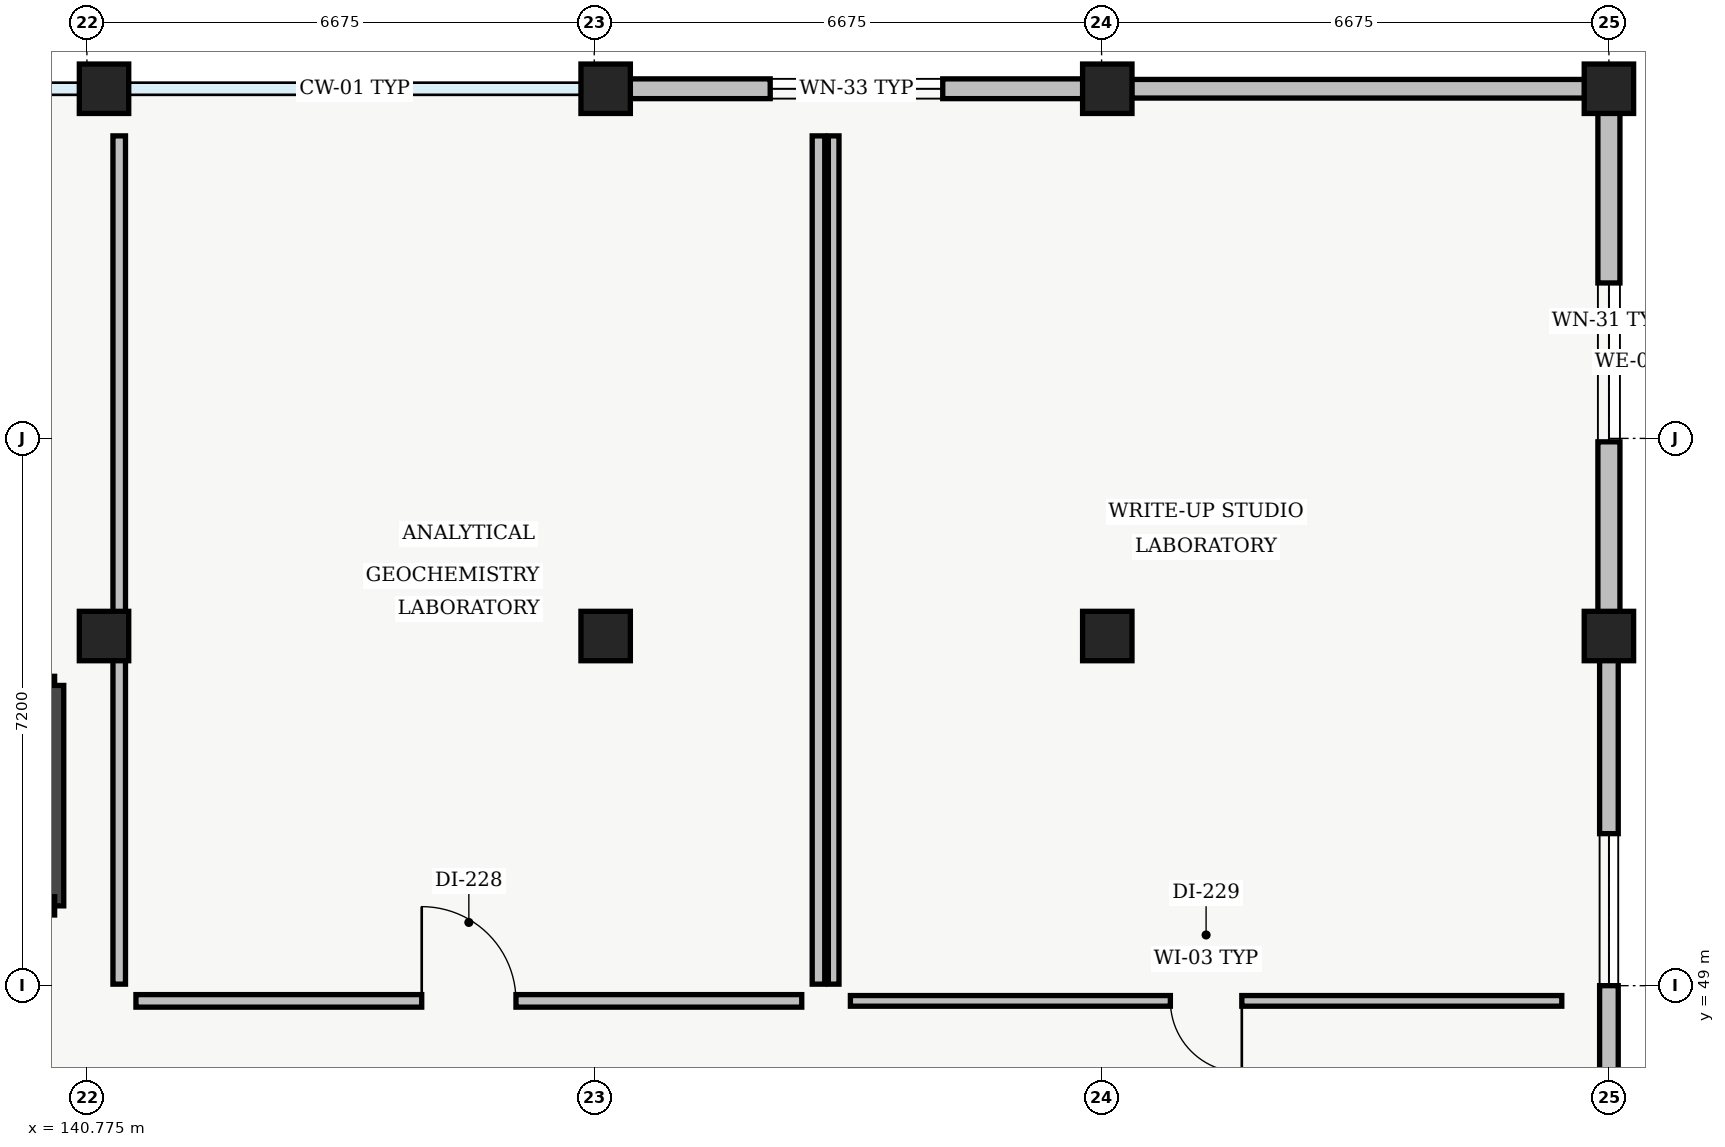
"""IFC4 building model, lengths in metres.
Left out: names, types, materials, properties, quantities, classifications, styles, units other than length and angle.
Written with IfcOpenShell. Run it as: python <this file> out.ifc"""

import sys

from ifc_helpers import new_model, si_unit, direction, frame, frame_2d, origin, origin_2d, place, context, subcontext, project, spatial, rectangle, extrude, element, fill, save


model = new_model("IFC4")
c1 = context("Model", 3, precision=1e-05, world=origin(), true_north=direction((0.0, 1.0)))
c2 = subcontext(c1, "Body", "Model", "MODEL_VIEW")
j1 = project(units=[si_unit("LENGTHUNIT", "METRE"), si_unit("PLANEANGLEUNIT", "RADIAN")], contexts=[c1])
p1 = place(None, origin())
s1 = spatial("IfcSite", under=j1, at=p1, CompositionType="ELEMENT")
p2 = place(p1, origin())
s2 = spatial("IfcBuilding", under=s1, at=p2, CompositionType="ELEMENT")
p3 = place(p2, frame((0.0, 0.0, 18.6)))
s3 = spatial("IfcBuildingStorey", under=s2, at=p3, CompositionType="ELEMENT", Elevation=18.6)
for number, where, z_axis, x_axis in (
    (1, (141.0, 53.6, 0.0), (0.0, 0.0, 1.0), (1.0, 0.0, 0.0)),
    (2, (141.0, 60.8, 0.0), (0.0, 0.0, 1.0), (1.0, 0.0, 0.0)),
    (3, (147.6, 53.6, 0.0), (0.0, 0.0, 1.0), (1.0, 0.0, 0.0)),
    (4, (147.6, 60.8, 0.0), (0.0, 0.0, 1.0), (1.0, 0.0, 0.0)),
    (5, (154.2, 53.6, 0.0), (0.0, 0.0, 1.0), (1.0, 0.0, 0.0)),
    (6, (154.2, 60.8, 0.0), (0.0, 0.0, 1.0), (1.0, 0.0, 0.0)),
    (7, (160.8, 53.6, 0.0), (0.0, 0.0, 1.0), (1.0, 0.0, 0.0)),
    (8, (160.8, 60.8, 0.0), (0.0, 0.0, 1.0), (1.0, 0.0, 0.0)),
):
    element("IfcColumn", number, at=place(p3, frame(where, z_axis=z_axis, x_axis=x_axis)), inside=s3, PredefinedType="COLUMN", context=c2, shape_type="SweptSolid", body=[
        extrude(rectangle(XDim=0.65, YDim=0.65, at=origin_2d()), origin(), (0.0, 0.0, 1.0), 4.3),
    ])
p4 = place(p3, frame((147.92, 60.8, 0.0), z_axis=(0.0, 0.0, 1.0), x_axis=(1.0, 0.0, 0.0)))
e9 = element("IfcWall", 9, at=p4, inside=s3, PredefinedType="STANDARD", context=c2, shape_type="SweptSolid", body=[
    extrude(rectangle(XDim=5.96, YDim=0.26, at=frame_2d((2.98, 0.0))), origin(), (0.0, 0.0, 1.0), 3.835),
])
p5 = place(p4, frame((1.845, 0.0, 0.95)))
e10 = element("IfcOpeningElement", 10, at=p5, cuts=e9, PredefinedType="OPENING", context=c2, shape_type="SweptSolid", body=[
    extrude(rectangle(XDim=2.27, YDim=1.48, at=frame_2d((1.135, 0.74))), frame((0.0, 0.13, 0.0), z_axis=(0.0, -1.0, 0.0), x_axis=(1.0, 0.0, 0.0)), (0.0, 0.0, 1.0), 0.26),
])
p6 = place(p3, frame((154.52, 60.8, 0.0), z_axis=(0.0, 0.0, 1.0), x_axis=(1.0, 0.0, 0.0)))
e11 = element("IfcWall", 11, at=p6, inside=s3, PredefinedType="STANDARD", context=c2, shape_type="SweptSolid", body=[
    extrude(rectangle(XDim=5.96, YDim=0.245, at=frame_2d((2.98, 0.0))), origin(), (0.0, 0.0, 1.0), 3.835),
])
p7 = place(p3, frame((160.8, 60.48, 0.0), z_axis=(0.0, 0.0, 1.0), x_axis=(0.0, -1.0, 0.0)))
e12 = element("IfcWall", 12, at=p7, inside=s3, PredefinedType="STANDARD", context=c2, shape_type="SweptSolid", body=[
    extrude(rectangle(XDim=6.56, YDim=0.29, at=frame_2d((3.28, 0.0))), origin(), (0.0, 0.0, 1.0), 3.835),
])
p8 = place(p7, frame((2.235, 0.0, 0.95)))
e13 = element("IfcOpeningElement", 13, at=p8, cuts=e12, PredefinedType="OPENING", context=c2, shape_type="SweptSolid", body=[
    extrude(rectangle(XDim=2.09, YDim=1.44, at=frame_2d((1.045, 0.72))), frame((0.0, 0.145, 0.0), z_axis=(0.0, -1.0, 0.0), x_axis=(1.0, 0.0, 0.0)), (0.0, 0.0, 1.0), 0.29),
])
p9 = place(p3, frame((160.8, 53.28, 0.0), z_axis=(0.0, 0.0, 1.0), x_axis=(0.0, -1.0, 0.0)))
e14 = element("IfcWall", 14, at=p9, inside=s3, PredefinedType="STANDARD", context=c2, shape_type="SweptSolid", body=[
    extrude(rectangle(XDim=6.56, YDim=0.245, at=frame_2d((3.28, 0.0))), origin(), (0.0, 0.0, 1.0), 3.835),
])
p10 = place(p9, frame((2.28, 0.0, 0.95)))
e15 = element("IfcOpeningElement", 15, at=p10, cuts=e14, PredefinedType="OPENING", context=c2, shape_type="SweptSolid", body=[
    extrude(rectangle(XDim=2.0, YDim=1.42, at=frame_2d((1.0, 0.71))), frame((0.0, 0.123, 0.0), z_axis=(0.0, -1.0, 0.0), x_axis=(1.0, 0.0, 0.0)), (0.0, 0.0, 1.0), 0.245),
])
p11 = place(p3, frame((138.05, 52.95, 0.0), z_axis=(0.0, 0.0, 1.0), x_axis=(1.0, 0.0, 0.0)))
e16 = element("IfcWall", 16, at=p11, inside=s3, PredefinedType="SHEAR", context=c2, shape_type="SweptSolid", body=[
    extrude(rectangle(XDim=2.3, YDim=0.24, at=frame_2d((1.15, 0.0))), origin(), (0.0, 0.0, 1.0), 4.28),
])
p12 = place(p3, frame((140.35, 52.95, 0.0), z_axis=(0.0, 0.0, 1.0), x_axis=(0.0, -1.0, 0.0)))
e17 = element("IfcWall", 17, at=p12, inside=s3, PredefinedType="SHEAR", context=c2, shape_type="SweptSolid", body=[
    extrude(rectangle(XDim=2.9, YDim=0.24, at=frame_2d((1.45, 0.0))), origin(), (0.0, 0.0, 1.0), 4.28),
])
p13 = place(p3, frame((140.35, 50.05, 0.0), z_axis=(0.0, 0.0, 1.0), x_axis=(-1.0, 0.0, 0.0)))
e18 = element("IfcWall", 18, at=p13, inside=s3, PredefinedType="SHEAR", context=c2, shape_type="SweptSolid", body=[
    extrude(rectangle(XDim=2.3, YDim=0.24, at=frame_2d((1.15, 0.0))), origin(), (0.0, 0.0, 1.0), 4.28),
])
p14 = place(p13, frame((0.425, 0.0, 0.0)))
e19 = element("IfcOpeningElement", 19, at=p14, cuts=e18, PredefinedType="OPENING", context=c2, shape_type="SweptSolid", body=[
    extrude(rectangle(XDim=1.45, YDim=2.3, at=frame_2d((0.725, 1.15))), frame((0.0, 0.12, 0.0), z_axis=(0.0, -1.0, 0.0), x_axis=(1.0, 0.0, 0.0)), (0.0, 0.0, 1.0), 0.24),
])
p15 = place(p3, frame((141.42, 48.8, 0.0), z_axis=(0.0, 0.0, 1.0), x_axis=(1.0, 0.0, 0.0)))
e20 = element("IfcWall", 20, at=p15, inside=s3, PredefinedType="PARTITIONING", context=c2, shape_type="SweptSolid", body=[
    extrude(rectangle(XDim=8.76, YDim=0.165, at=frame_2d((4.38, 0.0))), origin(), (0.0, 0.0, 1.0), 3.885),
])
p16 = place(p15, frame((3.76, 0.0, 0.0)))
e21 = element("IfcOpeningElement", 21, at=p16, cuts=e20, PredefinedType="OPENING", context=c2, shape_type="SweptSolid", body=[
    extrude(rectangle(XDim=1.24, YDim=2.06, at=frame_2d((0.62, 1.03))), frame((0.0, 0.083, 0.0), z_axis=(0.0, -1.0, 0.0), x_axis=(1.0, 0.0, 0.0)), (0.0, 0.0, 1.0), 0.165),
])
p17 = place(p3, frame((150.4, 49.02, 0.0), z_axis=(0.0, 0.0, 1.0), x_axis=(0.0, 1.0, 0.0)))
e22 = element("IfcWall", 22, at=p17, inside=s3, PredefinedType="PARTITIONING", context=c2, shape_type="SweptSolid", body=[
    extrude(rectangle(XDim=11.16, YDim=0.165, at=frame_2d((5.58, 0.0))), origin(), (0.0, 0.0, 1.0), 3.95),
])
p18 = place(p3, frame((141.2, 60.18, 0.0), z_axis=(0.0, 0.0, 1.0), x_axis=(0.0, -1.0, 0.0)))
e23 = element("IfcWall", 23, at=p18, inside=s3, PredefinedType="PARTITIONING", context=c2, shape_type="SweptSolid", body=[
    extrude(rectangle(XDim=11.16, YDim=0.165, at=frame_2d((5.58, 0.0))), origin(), (0.0, 0.0, 1.0), 3.685),
])
p19 = place(p3, frame((150.82, 48.8, 0.0), z_axis=(0.0, 0.0, 1.0), x_axis=(1.0, 0.0, 0.0)))
e24 = element("IfcWall", 24, at=p19, inside=s3, PredefinedType="PARTITIONING", context=c2, shape_type="SweptSolid", body=[
    extrude(rectangle(XDim=9.36, YDim=0.14, at=frame_2d((4.68, 0.0))), origin(), (0.0, 0.0, 1.0), 3.885),
])
p20 = place(p19, frame((4.21, 0.0, 0.0)))
e25 = element("IfcOpeningElement", 25, at=p20, cuts=e24, PredefinedType="OPENING", context=c2, shape_type="SweptSolid", body=[
    extrude(rectangle(XDim=0.94, YDim=2.12, at=frame_2d((0.47, 1.06))), frame((0.0, 0.07, 0.0), z_axis=(0.0, -1.0, 0.0), x_axis=(1.0, 0.0, 0.0)), (0.0, 0.0, 1.0), 0.14),
])
p21 = place(p3, frame((150.6, 60.18, 0.0), z_axis=(0.0, 0.0, 1.0), x_axis=(0.0, -1.0, 0.0)))
e26 = element("IfcWall", 26, at=p21, inside=s3, PredefinedType="PARTITIONING", context=c2, shape_type="SweptSolid", body=[
    extrude(rectangle(XDim=11.16, YDim=0.14, at=frame_2d((5.58, 0.0))), origin(), (0.0, 0.0, 1.0), 3.95),
])
p22 = place(p5, origin())
e27 = element("IfcWindow", 27, at=p22, inside=s3, PartitioningType="SINGLE_PANEL", PredefinedType="WINDOW", context=c2, shape_type="SweptSolid", body=[
    extrude(rectangle(XDim=2.27, YDim=1.48, at=frame_2d((1.135, 0.74))), frame((0.0, 0.03, 0.0), z_axis=(0.0, -1.0, 0.0), x_axis=(1.0, 0.0, 0.0)), (0.0, 0.0, 1.0), 0.06),
])
fill(e10, e27)
p23 = place(p8, origin())
e28 = element("IfcWindow", 28, at=p23, inside=s3, PartitioningType="SINGLE_PANEL", PredefinedType="WINDOW", context=c2, shape_type="SweptSolid", body=[
    extrude(rectangle(XDim=2.09, YDim=1.44, at=frame_2d((1.045, 0.72))), frame((0.0, 0.03, 0.0), z_axis=(0.0, -1.0, 0.0), x_axis=(1.0, 0.0, 0.0)), (0.0, 0.0, 1.0), 0.06),
])
fill(e13, e28)
p24 = place(p10, origin())
e29 = element("IfcWindow", 29, at=p24, inside=s3, PartitioningType="SINGLE_PANEL", PredefinedType="WINDOW", context=c2, shape_type="SweptSolid", body=[
    extrude(rectangle(XDim=2.0, YDim=1.42, at=frame_2d((1.0, 0.71))), frame((0.0, 0.03, 0.0), z_axis=(0.0, -1.0, 0.0), x_axis=(1.0, 0.0, 0.0)), (0.0, 0.0, 1.0), 0.06),
])
fill(e15, e29)
p25 = place(p16, origin())
e30 = element("IfcDoor", 30, at=p25, inside=s3, OperationType="SINGLE_SWING_LEFT", PredefinedType="DOOR", context=c2, shape_type="SweptSolid", body=[
    extrude(rectangle(XDim=1.24, YDim=2.06, at=frame_2d((0.62, 1.03))), frame((0.0, 0.025, 0.0), z_axis=(0.0, -1.0, 0.0), x_axis=(1.0, 0.0, 0.0)), (0.0, 0.0, 1.0), 0.05),
])
fill(e21, e30)
p26 = place(p20, origin())
e31 = element("IfcDoor", 31, at=p26, inside=s3, OperationType="SINGLE_SWING_RIGHT", PredefinedType="DOOR", context=c2, shape_type="SweptSolid", body=[
    extrude(rectangle(XDim=0.94, YDim=2.12, at=frame_2d((0.47, 1.06))), frame((0.0, 0.025, 0.0), z_axis=(0.0, -1.0, 0.0), x_axis=(1.0, 0.0, 0.0)), (0.0, 0.0, 1.0), 0.05),
])
fill(e25, e31)
save(model, sys.argv[1])
